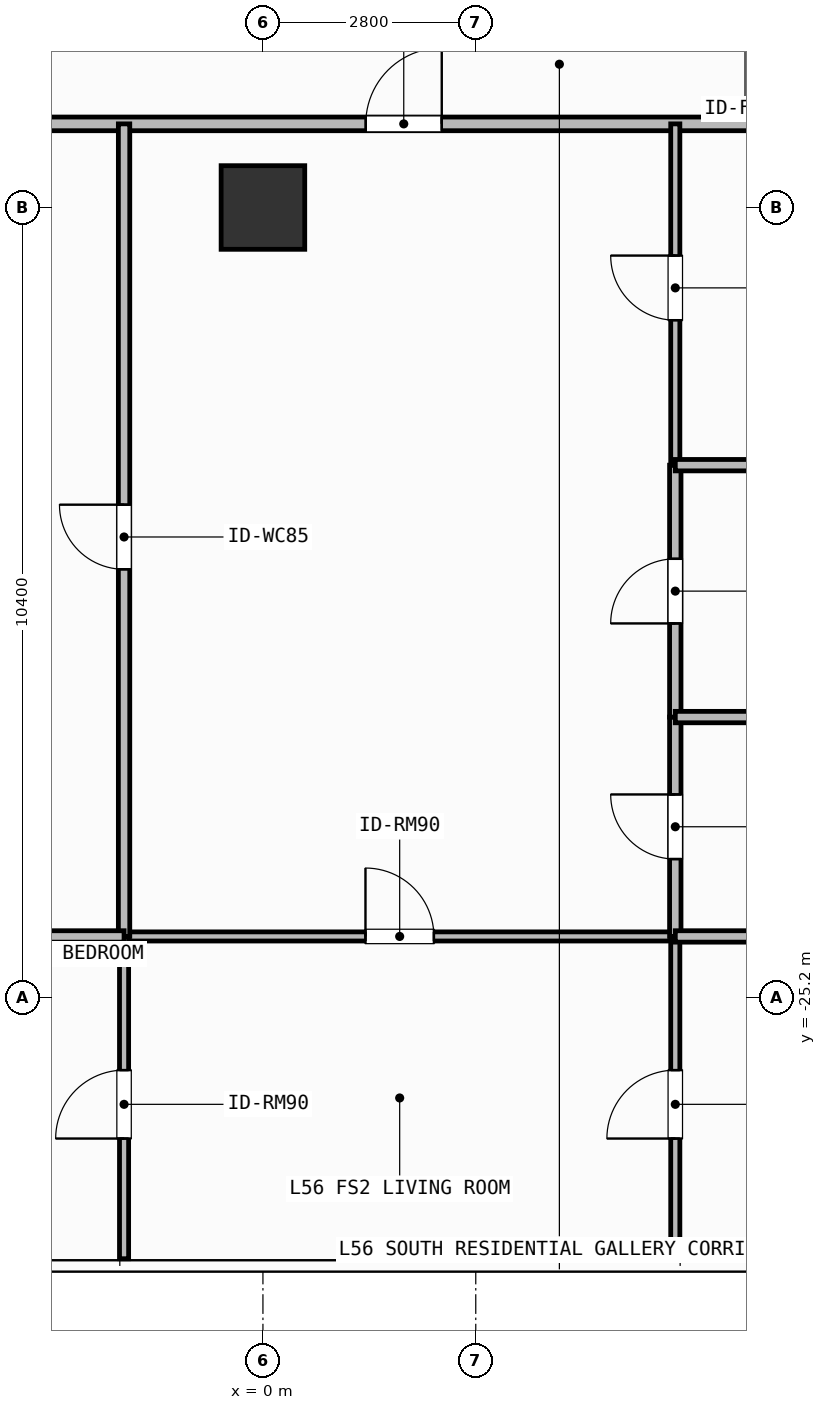
"""IFC4 building model, lengths in metres.
Left out: names, types, materials, properties, quantities, classifications, styles, units other than length and angle.
Written with IfcOpenShell. Run it as: python <this file> out.ifc"""

import sys

from ifc_helpers import new_model, si_unit, direction, frame, frame_2d, origin, origin_2d, place, context, subcontext, project, spatial, rectangle, extrude, element, fill, save


model = new_model("IFC4")
c1 = context("Model", 3, precision=1e-05, world=origin(), true_north=direction((0.0, 1.0)))
c2 = subcontext(c1, "Body", "Model", "MODEL_VIEW")
j1 = project(units=[si_unit("LENGTHUNIT", "METRE"), si_unit("PLANEANGLEUNIT", "RADIAN")], contexts=[c1])
p1 = place(None, origin())
s1 = spatial("IfcSite", under=j1, at=p1, CompositionType="ELEMENT")
p2 = place(p1, origin())
s2 = spatial("IfcBuilding", under=s1, at=p2, CompositionType="ELEMENT")
p3 = place(p2, frame((0.0, 0.0, 227.4)))
s3 = spatial("IfcBuildingStorey", under=s2, at=p3, CompositionType="ELEMENT", Elevation=227.4)
p4 = place(p3, frame((0.0, -14.8, 0.0), z_axis=(0.0, 0.0, 1.0), x_axis=(1.0, 0.0, 0.0)))
e1 = element("IfcColumn", 1, at=p4, inside=s3, PredefinedType="COLUMN", context=c2, shape_type="SweptSolid", body=[
    extrude(rectangle(XDim=1.1, YDim=1.1, at=origin_2d()), origin(), (0.0, 0.0, 1.0), 3.9),
])
p5 = place(p3, frame((-4.677, -13.7, 0.0), z_axis=(0.0, 0.0, 1.0), x_axis=(1.0, 0.0, 0.0)))
e2 = element("IfcWall", 2, at=p5, inside=s3, PredefinedType="PARTITIONING", context=c2, shape_type="SweptSolid", body=[
    extrude(rectangle(XDim=15.905, YDim=0.18, at=frame_2d((7.953, 0.0))), origin(), (0.0, 0.0, 1.0), 3.68),
])
p6 = place(p5, frame((6.03, 0.0, 0.0)))
e3 = element("IfcOpeningElement", 3, at=p6, cuts=e2, PredefinedType="OPENING", context=c2, shape_type="SweptSolid", body=[
    extrude(rectangle(XDim=1.0, YDim=2.2, at=frame_2d((0.5, 1.1))), frame((0.0, 0.1, 0.0), z_axis=(0.0, -1.0, 0.0), x_axis=(1.0, 0.0, 0.0)), (0.0, 0.0, 1.0), 0.2),
])
p7 = place(p3, frame((-1.827, -24.39, 0.0), z_axis=(0.0, 0.0, 1.0), x_axis=(1.0, 0.0, 0.0)))
e4 = element("IfcWall", 4, at=p7, inside=s3, PredefinedType="PARTITIONING", context=c2, shape_type="SweptSolid", body=[
    extrude(rectangle(XDim=7.252, YDim=0.12, at=frame_2d((3.626, 0.0))), origin(), (0.0, 0.0, 1.0), 3.68),
])
p8 = place(p7, frame((3.176, 0.0, 0.0)))
e5 = element("IfcOpeningElement", 5, at=p8, cuts=e4, PredefinedType="OPENING", context=c2, shape_type="SweptSolid", body=[
    extrude(rectangle(XDim=0.9, YDim=2.1, at=frame_2d((0.45, 1.05))), frame((0.0, 0.07, 0.0), z_axis=(0.0, -1.0, 0.0), x_axis=(1.0, 0.0, 0.0)), (0.0, 0.0, 1.0), 0.14),
])
p9 = place(p3, frame((-1.827, -24.39, 0.0), z_axis=(0.0, 0.0, 1.0), x_axis=(0.0, 1.0, 0.0)))
e6 = element("IfcWall", 6, at=p9, inside=s3, PredefinedType="PARTITIONING", context=c2, shape_type="SweptSolid", body=[
    extrude(rectangle(XDim=10.69, YDim=0.15, at=frame_2d((5.345, 0.0))), origin(), (0.0, 0.0, 1.0), 3.68),
])
p10 = place(p9, frame((4.83, 0.0, 0.0)))
e7 = element("IfcOpeningElement", 7, at=p10, cuts=e6, PredefinedType="OPENING", context=c2, shape_type="SweptSolid", body=[
    extrude(rectangle(XDim=0.85, YDim=2.1, at=frame_2d((0.425, 1.05))), frame((0.0, 0.085, 0.0), z_axis=(0.0, -1.0, 0.0), x_axis=(1.0, 0.0, 0.0)), (0.0, 0.0, 1.0), 0.17),
])
p11 = place(p3, frame((-1.827, -28.63, 0.0), z_axis=(0.0, 0.0, 1.0), x_axis=(0.0, 1.0, 0.0)))
e8 = element("IfcWall", 8, at=p11, inside=s3, PredefinedType="PARTITIONING", context=c2, shape_type="SweptSolid", body=[
    extrude(rectangle(XDim=4.24, YDim=0.12, at=frame_2d((2.12, 0.0))), origin(), (0.0, 0.0, 1.0), 3.68),
])
p12 = place(p11, frame((1.581, 0.0, 0.0)))
e9 = element("IfcOpeningElement", 9, at=p12, cuts=e8, PredefinedType="OPENING", context=c2, shape_type="SweptSolid", body=[
    extrude(rectangle(XDim=0.9, YDim=2.1, at=frame_2d((0.45, 1.05))), frame((0.0, 0.07, 0.0), z_axis=(0.0, -1.0, 0.0), x_axis=(1.0, 0.0, 0.0)), (0.0, 0.0, 1.0), 0.14),
])
p13 = place(p3, frame((5.425, -24.39, 0.0), z_axis=(0.0, 0.0, 1.0), x_axis=(0.0, 1.0, 0.0)))
e10 = element("IfcWall", 10, at=p13, inside=s3, PredefinedType="PARTITIONING", context=c2, shape_type="SweptSolid", body=[
    extrude(rectangle(XDim=2.886, YDim=0.15, at=frame_2d((1.443, 0.0))), origin(), (0.0, 0.0, 1.0), 3.68),
])
p14 = place(p13, frame((1.018, 0.0, 0.0)))
e11 = element("IfcOpeningElement", 11, at=p14, cuts=e10, PredefinedType="OPENING", context=c2, shape_type="SweptSolid", body=[
    extrude(rectangle(XDim=0.85, YDim=2.1, at=frame_2d((0.425, 1.05))), frame((0.0, 0.085, 0.0), z_axis=(0.0, -1.0, 0.0), x_axis=(1.0, 0.0, 0.0)), (0.0, 0.0, 1.0), 0.17),
])
p15 = place(p3, frame((5.425, -21.504, 0.0), z_axis=(0.0, 0.0, 1.0), x_axis=(0.0, 1.0, 0.0)))
e12 = element("IfcWall", 12, at=p15, inside=s3, PredefinedType="PARTITIONING", context=c2, shape_type="SweptSolid", body=[
    extrude(rectangle(XDim=3.314, YDim=0.15, at=frame_2d((1.657, 0.0))), origin(), (0.0, 0.0, 1.0), 3.68),
])
p16 = place(p15, frame((1.232, 0.0, 0.0)))
e13 = element("IfcOpeningElement", 13, at=p16, cuts=e12, PredefinedType="OPENING", context=c2, shape_type="SweptSolid", body=[
    extrude(rectangle(XDim=0.85, YDim=2.1, at=frame_2d((0.425, 1.05))), frame((0.0, 0.085, 0.0), z_axis=(0.0, -1.0, 0.0), x_axis=(1.0, 0.0, 0.0)), (0.0, 0.0, 1.0), 0.17),
])
p17 = place(p3, frame((5.425, -18.19, 0.0), z_axis=(0.0, 0.0, 1.0), x_axis=(0.0, 1.0, 0.0)))
e14 = element("IfcWall", 14, at=p17, inside=s3, PredefinedType="PARTITIONING", context=c2, shape_type="SweptSolid", body=[
    extrude(rectangle(XDim=4.49, YDim=0.12, at=frame_2d((2.245, 0.0))), origin(), (0.0, 0.0, 1.0), 3.68),
])
p18 = place(p17, frame((1.907, 0.0, 0.0)))
e15 = element("IfcOpeningElement", 15, at=p18, cuts=e14, PredefinedType="OPENING", context=c2, shape_type="SweptSolid", body=[
    extrude(rectangle(XDim=0.85, YDim=2.1, at=frame_2d((0.425, 1.05))), frame((0.0, 0.07, 0.0), z_axis=(0.0, -1.0, 0.0), x_axis=(1.0, 0.0, 0.0)), (0.0, 0.0, 1.0), 0.14),
])
p19 = place(p3, frame((5.425, -28.63, 0.0), z_axis=(0.0, 0.0, 1.0), x_axis=(0.0, 1.0, 0.0)))
e16 = element("IfcWall", 16, at=p19, inside=s3, PredefinedType="PARTITIONING", context=c2, shape_type="SweptSolid", body=[
    extrude(rectangle(XDim=4.24, YDim=0.12, at=frame_2d((2.12, 0.0))), origin(), (0.0, 0.0, 1.0), 3.68),
])
p20 = place(p19, frame((1.581, 0.0, 0.0)))
e17 = element("IfcOpeningElement", 17, at=p20, cuts=e16, PredefinedType="OPENING", context=c2, shape_type="SweptSolid", body=[
    extrude(rectangle(XDim=0.9, YDim=2.1, at=frame_2d((0.45, 1.05))), frame((0.0, 0.07, 0.0), z_axis=(0.0, -1.0, 0.0), x_axis=(1.0, 0.0, 0.0)), (0.0, 0.0, 1.0), 0.14),
])
p21 = place(p3, frame((-4.677, -24.39, 0.0), z_axis=(0.0, 0.0, 1.0), x_axis=(1.0, 0.0, 0.0)))
e18 = element("IfcWall", 18, at=p21, inside=s3, PredefinedType="PARTITIONING", context=c2, shape_type="SweptSolid", body=[
    extrude(rectangle(XDim=2.85, YDim=0.15, at=frame_2d((1.425, 0.0))), origin(), (0.0, 0.0, 1.0), 3.68),
])
for number, where, z_axis, x_axis in (
    (19, (5.425, -21.504, 0.0), (0.0, 0.0, 1.0), (1.0, 0.0, 0.0)),
    (20, (5.425, -18.19, 0.0), (0.0, 0.0, 1.0), (1.0, 0.0, 0.0)),
    (21, (5.425, -24.39, 0.0), (0.0, 0.0, 1.0), (1.0, 0.0, 0.0)),
):
    element("IfcWall", number, at=place(p3, frame(where, z_axis=z_axis, x_axis=x_axis)), inside=s3, PredefinedType="PARTITIONING", context=c2, shape_type="SweptSolid", body=[
        extrude(rectangle(XDim=5.803, YDim=0.15, at=frame_2d((2.901, 0.0))), origin(), (0.0, 0.0, 1.0), 3.68),
    ])
p22 = place(p6, origin())
e22 = element("IfcDoor", 22, at=p22, inside=s3, OperationType="SINGLE_SWING_RIGHT", PredefinedType="DOOR", context=c2, shape_type="SweptSolid", body=[
    extrude(rectangle(XDim=1.0, YDim=2.2, at=frame_2d((0.5, 1.1))), frame((0.0, 0.025, 0.0), z_axis=(0.0, -1.0, 0.0), x_axis=(1.0, 0.0, 0.0)), (0.0, 0.0, 1.0), 0.05),
])
fill(e3, e22)
p23 = place(p8, origin())
e23 = element("IfcDoor", 23, at=p23, inside=s3, OperationType="SINGLE_SWING_LEFT", PredefinedType="DOOR", context=c2, shape_type="SweptSolid", body=[
    extrude(rectangle(XDim=0.9, YDim=2.1, at=frame_2d((0.45, 1.05))), frame((0.0, 0.025, 0.0), z_axis=(0.0, -1.0, 0.0), x_axis=(1.0, 0.0, 0.0)), (0.0, 0.0, 1.0), 0.05),
])
fill(e5, e23)
p24 = place(p10, origin())
e24 = element("IfcDoor", 24, at=p24, inside=s3, OperationType="SINGLE_SWING_RIGHT", PredefinedType="DOOR", context=c2, shape_type="SweptSolid", body=[
    extrude(rectangle(XDim=0.85, YDim=2.1, at=frame_2d((0.425, 1.05))), frame((0.0, 0.025, 0.0), z_axis=(0.0, -1.0, 0.0), x_axis=(1.0, 0.0, 0.0)), (0.0, 0.0, 1.0), 0.05),
])
fill(e7, e24)
p25 = place(p12, origin())
e25 = element("IfcDoor", 25, at=p25, inside=s3, OperationType="SINGLE_SWING_LEFT", PredefinedType="DOOR", context=c2, shape_type="SweptSolid", body=[
    extrude(rectangle(XDim=0.9, YDim=2.1, at=frame_2d((0.45, 1.05))), frame((0.0, 0.025, 0.0), z_axis=(0.0, -1.0, 0.0), x_axis=(1.0, 0.0, 0.0)), (0.0, 0.0, 1.0), 0.05),
])
fill(e9, e25)
p26 = place(p14, origin())
e26 = element("IfcDoor", 26, at=p26, inside=s3, OperationType="SINGLE_SWING_RIGHT", PredefinedType="DOOR", context=c2, shape_type="SweptSolid", body=[
    extrude(rectangle(XDim=0.85, YDim=2.1, at=frame_2d((0.425, 1.05))), frame((0.0, 0.025, 0.0), z_axis=(0.0, -1.0, 0.0), x_axis=(1.0, 0.0, 0.0)), (0.0, 0.0, 1.0), 0.05),
])
fill(e11, e26)
p27 = place(p16, origin())
e27 = element("IfcDoor", 27, at=p27, inside=s3, OperationType="SINGLE_SWING_LEFT", PredefinedType="DOOR", context=c2, shape_type="SweptSolid", body=[
    extrude(rectangle(XDim=0.85, YDim=2.1, at=frame_2d((0.425, 1.05))), frame((0.0, 0.025, 0.0), z_axis=(0.0, -1.0, 0.0), x_axis=(1.0, 0.0, 0.0)), (0.0, 0.0, 1.0), 0.05),
])
fill(e13, e27)
p28 = place(p18, origin())
e28 = element("IfcDoor", 28, at=p28, inside=s3, OperationType="SINGLE_SWING_RIGHT", PredefinedType="DOOR", context=c2, shape_type="SweptSolid", body=[
    extrude(rectangle(XDim=0.85, YDim=2.1, at=frame_2d((0.425, 1.05))), frame((0.0, 0.025, 0.0), z_axis=(0.0, -1.0, 0.0), x_axis=(1.0, 0.0, 0.0)), (0.0, 0.0, 1.0), 0.05),
])
fill(e15, e28)
p29 = place(p20, origin())
e29 = element("IfcDoor", 29, at=p29, inside=s3, OperationType="SINGLE_SWING_LEFT", PredefinedType="DOOR", context=c2, shape_type="SweptSolid", body=[
    extrude(rectangle(XDim=0.9, YDim=2.1, at=frame_2d((0.45, 1.05))), frame((0.0, 0.025, 0.0), z_axis=(0.0, -1.0, 0.0), x_axis=(1.0, 0.0, 0.0)), (0.0, 0.0, 1.0), 0.05),
])
fill(e17, e29)
save(model, sys.argv[1])
